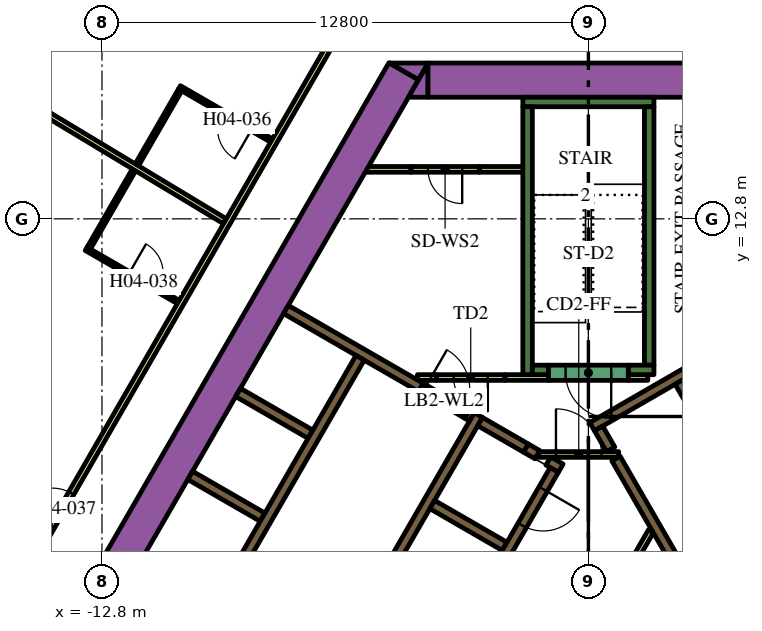
"""IFC4 building model, lengths in metres.
Left out: names, types, materials, properties, quantities, classifications, styles, units other than length and angle.
Written with IfcOpenShell. Run it as: python <this file> out.ifc"""

import sys

from ifc_helpers import new_model, si_unit, direction, frame, frame_2d, origin, place, context, subcontext, project, spatial, polyline, rectangle, outline, extrude, element, fill, save


model = new_model("IFC4")
c1 = context("Model", 3, precision=1e-05, world=origin(), true_north=direction((0.0, 1.0)))
c2 = subcontext(c1, "Body", "Model", "MODEL_VIEW")
j1 = project(units=[si_unit("LENGTHUNIT", "METRE"), si_unit("PLANEANGLEUNIT", "RADIAN")], contexts=[c1])
p1 = place(None, origin())
s1 = spatial("IfcSite", under=j1, at=p1, CompositionType="ELEMENT")
p2 = place(p1, origin())
s2 = spatial("IfcBuilding", under=s1, at=p2, CompositionType="ELEMENT")
p3 = place(p2, frame((0.0, 0.0, 70.5)))
s3 = spatial("IfcBuildingStorey", under=s2, at=p3, CompositionType="ELEMENT", Elevation=70.5)
p4 = place(p3, frame((-15.36, -1.503, 0.0), z_axis=(0.0, 0.0, 1.0), x_axis=(0.50000389221, 0.866023156604, 0.0)))
e1 = element("IfcWall", 1, at=p4, inside=s3, PredefinedType="SOLIDWALL", context=c2, shape_type="SweptSolid", body=[
    extrude(rectangle(XDim=21.0, YDim=0.9, at=frame_2d((10.5, 0.0))), origin(), (0.0, 0.0, 1.0), 3.9),
])
p5 = place(p3, origin())
e2 = element("IfcWall", 2, at=p5, inside=s3, PredefinedType="SOLIDWALL", context=c2, shape_type="SweptSolid", body=[
    extrude(outline(polyline([(-4.215, 16.9), (-4.469, 16.46), (-5.231, 16.9), (-4.215, 16.9)])), origin(), (0.0, 0.0, 1.0), 3.9),
])
p6 = place(p3, frame((-4.224, 16.45, 0.0), z_axis=(0.0, 0.0, 1.0), x_axis=(1.0, 0.0, 0.0)))
e3 = element("IfcWall", 3, at=p6, inside=s3, PredefinedType="SOLIDWALL", context=c2, shape_type="SweptSolid", body=[
    extrude(rectangle(XDim=9.488, YDim=0.9, at=frame_2d((4.744, 0.0))), origin(), (0.0, 0.0, 1.0), 3.9),
])
e4 = element("IfcWall", 4, at=p5, inside=s3, PredefinedType="SOLIDWALL", context=c2, shape_type="SweptSolid", body=[
    extrude(outline(polyline([(-4.734, 16.0), (-4.226, 16.88), (-4.226, 16.0), (-4.734, 16.0)])), origin(), (0.0, 0.0, 1.0), 3.9),
])
p7 = place(p3, frame((-1.725, 15.875, 0.0), z_axis=(0.0, 0.0, 1.0), x_axis=(1.0, 0.0, 0.0)))
e5 = element("IfcWall", 5, at=p7, inside=s3, PredefinedType="SOLIDWALL", context=c2, shape_type="SweptSolid", body=[
    extrude(rectangle(XDim=3.45, YDim=0.25, at=frame_2d((1.725, 0.0))), origin(), (0.0, 0.0, 1.0), 3.9),
])
p8 = place(p3, frame((1.6, 8.95, 0.0), z_axis=(0.0, 0.0, 1.0), x_axis=(0.0, 1.0, 0.0)))
e6 = element("IfcWall", 6, at=p8, inside=s3, PredefinedType="SOLIDWALL", context=c2, shape_type="SweptSolid", body=[
    extrude(rectangle(XDim=6.8, YDim=0.25, at=frame_2d((3.4, 0.0))), origin(), (0.0, 0.0, 1.0), 3.9),
])
p9 = place(p3, frame((1.05, 8.825, 0.0), z_axis=(0.0, 0.0, 1.0), x_axis=(1.0, 0.0, 0.0)))
e7 = element("IfcWall", 7, at=p9, inside=s3, PredefinedType="SOLIDWALL", context=c2, shape_type="SweptSolid", body=[
    extrude(rectangle(XDim=0.675, YDim=0.25, at=frame_2d((0.337, 0.0))), origin(), (0.0, 0.0, 1.0), 3.9),
])
p10 = place(p3, frame((-1.6, 8.7, 0.0), z_axis=(0.0, 0.0, 1.0), x_axis=(0.0, 1.0, 0.0)))
e8 = element("IfcWall", 8, at=p10, inside=s3, PredefinedType="SOLIDWALL", context=c2, shape_type="SweptSolid", body=[
    extrude(rectangle(XDim=7.05, YDim=0.25, at=frame_2d((3.525, 0.0))), origin(), (0.0, 0.0, 1.0), 3.9),
])
p11 = place(p3, frame((-1.475, 8.825, 0.0), z_axis=(0.0, 0.0, 1.0), x_axis=(1.0, 0.0, 0.0)))
e9 = element("IfcWall", 9, at=p11, inside=s3, PredefinedType="SOLIDWALL", context=c2, shape_type="SweptSolid", body=[
    extrude(rectangle(XDim=0.425, YDim=0.25, at=frame_2d((0.212, 0.0))), origin(), (0.0, 0.0, 1.0), 3.9),
])
p12 = place(p3, frame((0.098, 7.331, 0.0), z_axis=(0.0, 0.0, 1.0), x_axis=(0.865988154826, 0.50006451154, 0.0)))
e10 = element("IfcWall", 10, at=p12, inside=s3, PredefinedType="SOLIDWALL", context=c2, shape_type="SweptSolid", body=[
    extrude(rectangle(XDim=3.398, YDim=0.25, at=frame_2d((1.699, 0.0))), origin(), (0.0, 0.0, 1.0), 3.9),
])
p13 = place(p3, frame((0.268, 7.285, 0.0), z_axis=(0.0, 0.0, 1.0), x_axis=(0.500098681536, -0.865968422476, 0.0)))
e11 = element("IfcWall", 11, at=p13, inside=s3, PredefinedType="SOLIDWALL", context=c2, shape_type="SweptSolid", body=[
    extrude(rectangle(XDim=0.636, YDim=0.25, at=frame_2d((0.318, 0.0))), origin(), (0.0, 0.0, 1.0), 3.9),
])
p14 = place(p3, frame((5.97, -2.591, 0.0), z_axis=(0.0, 0.0, 1.0), x_axis=(-0.499994469932, 0.866028596547, 0.0)))
e12 = element("IfcWall", 12, at=p14, inside=s3, PredefinedType="SOLIDWALL", context=c2, shape_type="SweptSolid", body=[
    extrude(rectangle(XDim=10.488, YDim=0.25, at=frame_2d((5.244, 0.0))), origin(), (0.0, 0.0, 1.0), 3.9),
])
p15 = place(p3, frame((-8.06, -1.311, 0.0), z_axis=(0.0, 0.0, 1.0), x_axis=(0.50000273126, 0.866023826885, 0.0)))
e13 = element("IfcWall", 13, at=p15, inside=s3, PredefinedType="SOLIDWALL", context=c2, shape_type="SweptSolid", body=[
    extrude(rectangle(XDim=10.33, YDim=0.25, at=frame_2d((5.165, 0.0))), origin(), (0.0, 0.0, 1.0), 3.9),
])
p16 = place(p3, frame((-1.342, 6.595, 0.0), z_axis=(0.0, 0.0, 1.0), x_axis=(-0.866046247233, 0.49996389635, 0.0)))
e14 = element("IfcWall", 14, at=p16, inside=s3, PredefinedType="SOLIDWALL", context=c2, shape_type="SweptSolid", body=[
    extrude(rectangle(XDim=0.35, YDim=0.25, at=frame_2d((0.175, 0.0))), origin(), (0.0, 0.0, 1.0), 3.9),
])
p17 = place(p3, frame((-1.647, 6.771, 0.0), z_axis=(0.0, 0.0, 1.0), x_axis=(-0.865971728693, 0.500092956464, 0.0)))
e15 = element("IfcWall", 15, at=p17, inside=s3, PredefinedType="SOLIDWALL", context=c2, shape_type="SweptSolid", body=[
    extrude(rectangle(XDim=1.388, YDim=0.25, at=frame_2d((0.694, 0.0))), origin(), (0.0, 0.0, 1.0), 3.9),
])
p18 = place(p3, frame((-0.728, 6.24, 0.0), z_axis=(0.0, 0.0, 1.0), x_axis=(-0.866088799389, 0.499890179513, 0.0)))
e16 = element("IfcWall", 16, at=p18, inside=s3, PredefinedType="SOLIDWALL", context=c2, shape_type="SweptSolid", body=[
    extrude(rectangle(XDim=0.378, YDim=0.25, at=frame_2d((0.189, 0.0))), origin(), (0.0, 0.0, 1.0), 3.9),
])
p19 = place(p3, frame((-2.204, 4.182, 0.0), z_axis=(0.0, 0.0, 1.0), x_axis=(-0.866008176907, 0.50002983664, 0.0)))
e17 = element("IfcWall", 17, at=p19, inside=s3, PredefinedType="SOLIDWALL", context=c2, shape_type="SweptSolid", body=[
    extrude(rectangle(XDim=2.2, YDim=0.25, at=frame_2d((1.1, 0.0))), origin(), (0.0, 0.0, 1.0), 3.9),
])
e18 = element("IfcWall", 18, at=p5, inside=s3, PredefinedType="SOLIDWALL", context=c2, shape_type="SweptSolid", body=[
    extrude(outline(polyline([(-3.128, 7.481), (-3.259, 7.557), (-3.134, 7.773), (-3.003, 7.698), (-3.128, 7.481)])), origin(), (0.0, 0.0, 1.0), 3.9),
])
for number, where, z_axis, x_axis in (
    (19, (-8.574, 4.95, 0.0), (0.0, 0.0, 1.0), (-0.866, 0.5, 0.0)),
    (20, (-7.314, 7.132, 0.0), (0.0, 0.0, 1.0), (-0.866, 0.5, 0.0)),
):
    element("IfcWall", number, at=place(p3, frame(where, z_axis=z_axis, x_axis=x_axis)), inside=s3, PredefinedType="SOLIDWALL", context=c2, shape_type="SweptSolid", body=[
        extrude(rectangle(XDim=2.2, YDim=0.25, at=frame_2d((1.1, 0.0))), origin(), (0.0, 0.0, 1.0), 3.9),
    ])
p20 = place(p3, frame((-7.959, 10.415, 0.0), z_axis=(0.0, 0.0, 1.0), x_axis=(0.866020958405, -0.500007699544, 0.0)))
e21 = element("IfcWall", 21, at=p20, inside=s3, PredefinedType="SOLIDWALL", context=c2, shape_type="SweptSolid", body=[
    extrude(rectangle(XDim=4.1, YDim=0.25, at=frame_2d((2.05, 0.0))), origin(), (0.0, 0.0, 1.0), 3.9),
])
p21 = place(p3, frame((-3.997, 8.625, 0.0), z_axis=(0.0, 0.0, 1.0), x_axis=(-1.0, 0.0, 0.0)))
e22 = element("IfcWall", 22, at=p21, inside=s3, PredefinedType="PARTITIONING", context=c2, shape_type="SweptSolid", body=[
    extrude(rectangle(XDim=0.502, YDim=0.15, at=frame_2d((0.251, 0.0))), origin(), (0.0, 0.0, 1.0), 2.75),
])
p22 = place(p3, frame((-5.851, 14.102, 0.0), z_axis=(0.0, 0.0, 1.0), x_axis=(1.0, 0.0, 0.0)))
e23 = element("IfcWall", 23, at=p22, inside=s3, PredefinedType="PARTITIONING", context=c2, shape_type="SweptSolid", body=[
    extrude(rectangle(XDim=1.18, YDim=0.15, at=frame_2d((0.59, 0.0))), origin(), (0.0, 0.0, 1.0), 2.75),
])
p23 = place(p3, frame((-2.871, 14.102, 0.0), z_axis=(0.0, 0.0, 1.0), x_axis=(1.0, 0.0, 0.0)))
e24 = element("IfcWall", 24, at=p23, inside=s3, PredefinedType="PARTITIONING", context=c2, shape_type="SweptSolid", body=[
    extrude(rectangle(XDim=1.196, YDim=0.15, at=frame_2d((0.598, 0.0))), origin(), (0.0, 0.0, 1.0), 2.75),
])
p24 = place(p3, frame((-0.3, 1.212, 0.0), z_axis=(0.0, 0.0, 1.0), x_axis=(0.499963101113, 0.866046706318, 0.0)))
e25 = element("IfcWall", 25, at=p24, inside=s3, PredefinedType="PARTITIONING", context=c2, shape_type="SweptSolid", body=[
    extrude(rectangle(XDim=3.893, YDim=0.15, at=frame_2d((1.947, 0.0))), origin(), (0.0, 0.0, 1.0), 2.75),
])
p25 = place(p3, frame((-2.196, 8.625, 0.0), z_axis=(0.0, 0.0, 1.0), x_axis=(1.0, 0.0, 0.0)))
e26 = element("IfcWall", 26, at=p25, inside=s3, PredefinedType="PARTITIONING", context=c2, shape_type="SweptSolid", body=[
    extrude(rectangle(XDim=1.146, YDim=0.15, at=frame_2d((0.573, 0.0))), origin(), (0.0, 0.0, 1.0), 2.75),
])
p26 = place(p3, frame((1.05, 8.625, 0.0), z_axis=(0.0, 0.0, 1.0), x_axis=(1.0, 0.0, 0.0)))
e27 = element("IfcWall", 27, at=p26, inside=s3, PredefinedType="PARTITIONING", context=c2, shape_type="SweptSolid", body=[
    extrude(rectangle(XDim=0.514, YDim=0.15, at=frame_2d((0.257, 0.0))), origin(), (0.0, 0.0, 1.0), 2.75),
])
p27 = place(p3, frame((8.565, -2.185, 0.0), z_axis=(0.0, 0.0, 1.0), x_axis=(-0.499997954832, 0.866026584559, 0.0)))
e28 = element("IfcWall", 28, at=p27, inside=s3, PredefinedType="SOLIDWALL", context=c2, shape_type="SweptSolid", body=[
    extrude(rectangle(XDim=12.35, YDim=0.25, at=frame_2d((6.175, 0.0))), origin(), (0.0, 0.0, 1.0), 3.9),
])
p28 = place(p27, frame((5.725, 0.0, 0.0)))
e29 = element("IfcOpeningElement", 29, at=p28, cuts=e28, PredefinedType="OPENING", context=c2, shape_type="SweptSolid", body=[
    extrude(rectangle(XDim=0.9, YDim=2.1, at=frame_2d((0.45, 1.05))), frame((0.0, 0.135, 0.0), z_axis=(0.0, -1.0, 0.0), x_axis=(1.0, 0.0, 0.0)), (0.0, 0.0, 1.0), 0.27),
])
p29 = place(p3, frame((-6.008, 9.144, 0.0), z_axis=(0.0, 0.0, 1.0), x_axis=(-0.500006956611, -0.866021387346, 0.0)))
e30 = element("IfcWall", 30, at=p29, inside=s3, PredefinedType="SOLIDWALL", context=c2, shape_type="SweptSolid", body=[
    extrude(rectangle(XDim=9.83, YDim=0.25, at=frame_2d((4.915, 0.0))), origin(), (0.0, 0.0, 1.0), 3.9),
])
p30 = place(p29, frame((6.985, 0.0, 0.0)))
e31 = element("IfcOpeningElement", 31, at=p30, cuts=e30, PredefinedType="OPENING", context=c2, shape_type="SweptSolid", body=[
    extrude(rectangle(XDim=0.9, YDim=2.1, at=frame_2d((0.45, 1.05))), frame((0.0, 0.135, 0.0), z_axis=(0.0, -1.0, 0.0), x_axis=(1.0, 0.0, 0.0)), (0.0, 0.0, 1.0), 0.27),
])
p31 = place(p3, frame((-0.898, 6.194, 0.0), z_axis=(0.0, 0.0, 1.0), x_axis=(-0.499996202215, -0.866027596426, 0.0)))
e32 = element("IfcWall", 32, at=p31, inside=s3, PredefinedType="SOLIDWALL", context=c2, shape_type="SweptSolid", body=[
    extrude(rectangle(XDim=9.83, YDim=0.25, at=frame_2d((4.915, 0.0))), origin(), (0.0, 0.0, 1.0), 3.9),
])
p32 = place(p31, frame((0.585, 0.0, 0.0)))
e33 = element("IfcOpeningElement", 33, at=p32, cuts=e32, PredefinedType="OPENING", context=c2, shape_type="SweptSolid", body=[
    extrude(rectangle(XDim=1.1, YDim=2.1, at=frame_2d((0.55, 1.05))), frame((0.0, 0.135, 0.0), z_axis=(0.0, -1.0, 0.0), x_axis=(1.0, 0.0, 0.0)), (0.0, 0.0, 1.0), 0.27),
])
p33 = place(p31, frame((3.105, 0.0, 0.0)))
e34 = element("IfcOpeningElement", 34, at=p33, cuts=e32, PredefinedType="OPENING", context=c2, shape_type="SweptSolid", body=[
    extrude(rectangle(XDim=1.1, YDim=2.1, at=frame_2d((0.55, 1.05))), frame((0.0, 0.135, 0.0), z_axis=(0.0, -1.0, 0.0), x_axis=(1.0, 0.0, 0.0)), (0.0, 0.0, 1.0), 0.27),
])
p34 = place(p31, frame((5.625, 0.0, 0.0)))
e35 = element("IfcOpeningElement", 35, at=p34, cuts=e32, PredefinedType="OPENING", context=c2, shape_type="SweptSolid", body=[
    extrude(rectangle(XDim=1.1, YDim=2.1, at=frame_2d((0.55, 1.05))), frame((0.0, 0.135, 0.0), z_axis=(0.0, -1.0, 0.0), x_axis=(1.0, 0.0, 0.0)), (0.0, 0.0, 1.0), 0.27),
])
p35 = place(p31, frame((8.145, 0.0, 0.0)))
e36 = element("IfcOpeningElement", 36, at=p35, cuts=e32, PredefinedType="OPENING", context=c2, shape_type="SweptSolid", body=[
    extrude(rectangle(XDim=1.1, YDim=2.1, at=frame_2d((0.55, 1.05))), frame((0.0, 0.135, 0.0), z_axis=(0.0, -1.0, 0.0), x_axis=(1.0, 0.0, 0.0)), (0.0, 0.0, 1.0), 0.27),
])
p36 = place(p3, frame((1.05, 8.75, 0.0), z_axis=(0.0, 0.0, 1.0), x_axis=(-1.0, 0.0, 0.0)))
e37 = element("IfcWall", 37, at=p36, inside=s3, PredefinedType="SOLIDWALL", context=c2, shape_type="SweptSolid", body=[
    extrude(rectangle(XDim=2.1, YDim=0.4, at=frame_2d((1.05, 0.0))), origin(), (0.0, 0.0, 1.0), 3.9),
])
p37 = place(p36, frame((0.45, 0.0, 0.0)))
e38 = element("IfcOpeningElement", 38, at=p37, cuts=e37, PredefinedType="OPENING", context=c2, shape_type="SweptSolid", body=[
    extrude(rectangle(XDim=1.2, YDim=2.1, at=frame_2d((0.6, 1.05))), frame((0.0, 0.21, 0.0), z_axis=(0.0, -1.0, 0.0), x_axis=(1.0, 0.0, 0.0)), (0.0, 0.0, 1.0), 0.42),
])
p38 = place(p3, frame((-2.196, 8.625, 0.0), z_axis=(0.0, 0.0, 1.0), x_axis=(-1.0, 0.0, 0.0)))
e39 = element("IfcWall", 39, at=p38, inside=s3, PredefinedType="PARTITIONING", context=c2, shape_type="SweptSolid", body=[
    extrude(rectangle(XDim=1.8, YDim=0.15, at=frame_2d((0.9, 0.0))), origin(), (0.0, 0.0, 1.0), 2.75),
])
p39 = place(p38, frame((0.45, 0.0, 0.0)))
e40 = element("IfcOpeningElement", 40, at=p39, cuts=e39, PredefinedType="OPENING", context=c2, shape_type="SweptSolid", body=[
    extrude(rectangle(XDim=0.9, YDim=2.1, at=frame_2d((0.45, 1.05))), frame((0.0, 0.085, 0.0), z_axis=(0.0, -1.0, 0.0), x_axis=(1.0, 0.0, 0.0)), (0.0, 0.0, 1.0), 0.17),
])
p40 = place(p3, frame((-1.303, 6.6, 0.0), z_axis=(0.0, 0.0, 1.0), x_axis=(1.0, 0.0, 0.0)))
e41 = element("IfcWall", 41, at=p40, inside=s3, PredefinedType="PARTITIONING", context=c2, shape_type="SweptSolid", body=[
    extrude(rectangle(XDim=2.1, YDim=0.15, at=frame_2d((1.05, 0.0))), origin(), (0.0, 0.0, 1.0), 3.9),
])
p41 = place(p40, frame((0.45, 0.0, 0.0)))
e42 = element("IfcOpeningElement", 42, at=p41, cuts=e41, PredefinedType="OPENING", context=c2, shape_type="SweptSolid", body=[
    extrude(rectangle(XDim=1.2, YDim=2.1, at=frame_2d((0.6, 1.05))), frame((0.0, 0.085, 0.0), z_axis=(0.0, -1.0, 0.0), x_axis=(1.0, 0.0, 0.0)), (0.0, 0.0, 1.0), 0.17),
])
p42 = place(p3, frame((-4.409, 8.365, 0.0), z_axis=(0.0, 0.0, 1.0), x_axis=(0.866034573852, -0.49998411664, 0.0)))
e43 = element("IfcWall", 43, at=p42, inside=s3, PredefinedType="SOLIDWALL", context=c2, shape_type="SweptSolid", body=[
    extrude(rectangle(XDim=1.4, YDim=0.25, at=frame_2d((0.7, 0.0))), origin(), (0.0, 0.0, 1.0), 3.9),
])
p43 = place(p42, frame((0.1, 0.0, 0.0)))
e44 = element("IfcOpeningElement", 44, at=p43, cuts=e43, PredefinedType="OPENING", context=c2, shape_type="SweptSolid", body=[
    extrude(rectangle(XDim=1.2, YDim=2.1, at=frame_2d((0.6, 1.05))), frame((0.0, 0.135, 0.0), z_axis=(0.0, -1.0, 0.0), x_axis=(1.0, 0.0, 0.0)), (0.0, 0.0, 1.0), 0.27),
])
p44 = place(p3, frame((-2.871, 14.102, 0.0), z_axis=(0.0, 0.0, 1.0), x_axis=(-1.0, 0.0, 0.0)))
e45 = element("IfcWall", 45, at=p44, inside=s3, PredefinedType="PARTITIONING", context=c2, shape_type="SweptSolid", body=[
    extrude(rectangle(XDim=1.8, YDim=0.15, at=frame_2d((0.9, 0.0))), origin(), (0.0, 0.0, 1.0), 2.75),
])
p45 = place(p44, frame((0.45, 0.0, 0.0)))
e46 = element("IfcOpeningElement", 46, at=p45, cuts=e45, PredefinedType="OPENING", context=c2, shape_type="SweptSolid", body=[
    extrude(rectangle(XDim=0.9, YDim=2.1, at=frame_2d((0.45, 1.05))), frame((0.0, 0.085, 0.0), z_axis=(0.0, -1.0, 0.0), x_axis=(1.0, 0.0, 0.0)), (0.0, 0.0, 1.0), 0.17),
])
p46 = place(p3, frame((-19.081, -3.9, 0.0), z_axis=(0.0, 0.0, 1.0), x_axis=(0.499998313975, 0.866026377209, 0.0)))
e47 = element("IfcWall", 47, at=p46, inside=s3, PredefinedType="PARTITIONING", context=c2, shape_type="SweptSolid", body=[
    extrude(rectangle(XDim=25.766, YDim=0.15, at=frame_2d((12.883, 0.0))), origin(), (0.0, 0.0, 1.0), 2.75),
])
p47 = place(p46, frame((24.586, 0.0, 0.0)))
e48 = element("IfcOpeningElement", 48, at=p47, cuts=e47, PredefinedType="OPENING", context=c2, shape_type="SweptSolid", body=[
    extrude(rectangle(XDim=1.0, YDim=2.1, at=frame_2d((0.5, 1.05))), frame((0.0, 0.085, 0.0), z_axis=(0.0, -1.0, 0.0), x_axis=(1.0, 0.0, 0.0)), (0.0, 0.0, 1.0), 0.17),
])
p48 = place(p46, frame((9.948, 0.0, 0.0)))
e49 = element("IfcOpeningElement", 49, at=p48, cuts=e47, PredefinedType="OPENING", context=c2, shape_type="SweptSolid", body=[
    extrude(rectangle(XDim=1.0, YDim=2.1, at=frame_2d((0.5, 1.05))), frame((0.0, 0.085, 0.0), z_axis=(0.0, -1.0, 0.0), x_axis=(1.0, 0.0, 0.0)), (0.0, 0.0, 1.0), 0.17),
])
p49 = place(p46, frame((7.782, 0.0, 0.0)))
e50 = element("IfcOpeningElement", 50, at=p49, cuts=e47, PredefinedType="OPENING", context=c2, shape_type="SweptSolid", body=[
    extrude(rectangle(XDim=0.9, YDim=2.1, at=frame_2d((0.45, 1.05))), frame((0.0, 0.085, 0.0), z_axis=(0.0, -1.0, 0.0), x_axis=(1.0, 0.0, 0.0)), (0.0, 0.0, 1.0), 0.17),
])
p50 = place(p46, frame((4.658, 0.0, 0.0)))
e51 = element("IfcOpeningElement", 51, at=p50, cuts=e47, PredefinedType="OPENING", context=c2, shape_type="SweptSolid", body=[
    extrude(rectangle(XDim=0.9, YDim=2.1, at=frame_2d((0.45, 1.05))), frame((0.0, 0.085, 0.0), z_axis=(0.0, -1.0, 0.0), x_axis=(1.0, 0.0, 0.0)), (0.0, 0.0, 1.0), 0.17),
])
p51 = place(p3, frame((-16.729, 17.052, 0.0), z_axis=(0.0, 0.0, 1.0), x_axis=(0.856630606266, -0.515930232113, 0.0)))
e52 = element("IfcWall", 52, at=p51, inside=s3, PredefinedType="PARTITIONING", context=c2, shape_type="SweptSolid", body=[
    extrude(rectangle(XDim=8.355, YDim=0.15, at=frame_2d((4.178, 0.0))), origin(), (0.0, 0.0, 1.0), 2.75),
])
p52 = place(p3, frame((-8.337, 14.861, 0.0), z_axis=(0.0, 0.0, 1.0), x_axis=(-0.866034573852, 0.49998411664, 0.0)))
e53 = element("IfcWall", 53, at=p52, inside=s3, PredefinedType="PARTITIONING", context=c2, shape_type="SweptSolid", body=[
    extrude(rectangle(XDim=2.8, YDim=0.1, at=frame_2d((1.4, 0.0))), origin(), (0.0, 0.0, 1.0), 2.75),
])
p53 = place(p52, frame((0.6, 0.0, 0.0)))
e54 = element("IfcOpeningElement", 54, at=p53, cuts=e53, PredefinedType="OPENING", context=c2, shape_type="SweptSolid", body=[
    extrude(rectangle(XDim=0.9, YDim=2.1, at=frame_2d((0.45, 1.05))), frame((0.0, 0.06, 0.0), z_axis=(0.0, -1.0, 0.0), x_axis=(1.0, 0.0, 0.0)), (0.0, 0.0, 1.0), 0.12),
])
p54 = place(p3, frame((-10.743, 16.192, 0.0), z_axis=(0.0, 0.0, 1.0), x_axis=(-0.500014167291, -0.866017224141, 0.0)))
e55 = element("IfcWall", 55, at=p54, inside=s3, PredefinedType="PARTITIONING", context=c2, shape_type="SweptSolid", body=[
    extrude(rectangle(XDim=2.27, YDim=0.1, at=frame_2d((1.135, 0.0))), origin(), (0.0, 0.0, 1.0), 2.75),
])
p55 = place(p3, frame((-13.215, 12.011, 0.0), z_axis=(0.0, 0.0, 1.0), x_axis=(0.865996816683, -0.500049511043, 0.0)))
e56 = element("IfcWall", 56, at=p55, inside=s3, PredefinedType="PARTITIONING", context=c2, shape_type="SweptSolid", body=[
    extrude(rectangle(XDim=2.8, YDim=0.1, at=frame_2d((1.4, 0.0))), origin(), (0.0, 0.0, 1.0), 2.75),
])
p56 = place(p55, frame((1.3, 0.0, 0.0)))
e57 = element("IfcOpeningElement", 57, at=p56, cuts=e56, PredefinedType="OPENING", context=c2, shape_type="SweptSolid", body=[
    extrude(rectangle(XDim=0.9, YDim=2.1, at=frame_2d((0.45, 1.05))), frame((0.0, 0.06, 0.0), z_axis=(0.0, -1.0, 0.0), x_axis=(1.0, 0.0, 0.0)), (0.0, 0.0, 1.0), 0.12),
])
p57 = place(p3, frame((-13.147, 12.029, 0.0), z_axis=(0.0, 0.0, 1.0), x_axis=(0.499939447199, 0.866060361138, 0.0)))
e58 = element("IfcWall", 58, at=p57, inside=s3, PredefinedType="PARTITIONING", context=c2, shape_type="SweptSolid", body=[
    extrude(rectangle(XDim=2.37, YDim=0.1, at=frame_2d((1.185, 0.0))), origin(), (0.0, 0.0, 1.0), 2.75),
])
p58 = place(p32, origin())
e59 = element("IfcDoor", 59, at=p58, inside=s3, OperationType="DOUBLE_DOOR_SLIDING", PredefinedType="DOOR", context=c2, shape_type="SweptSolid", body=[
    extrude(rectangle(XDim=1.1, YDim=2.1, at=frame_2d((0.55, 1.05))), frame((0.0, 0.025, 0.0), z_axis=(0.0, -1.0, 0.0), x_axis=(1.0, 0.0, 0.0)), (0.0, 0.0, 1.0), 0.05),
])
fill(e33, e59)
p59 = place(p37, origin())
e60 = element("IfcDoor", 60, at=p59, inside=s3, OperationType="SINGLE_SWING_LEFT", PredefinedType="DOOR", context=c2, shape_type="SweptSolid", body=[
    extrude(rectangle(XDim=1.2, YDim=2.1, at=frame_2d((0.6, 1.05))), frame((0.0, 0.025, 0.0), z_axis=(0.0, -1.0, 0.0), x_axis=(1.0, 0.0, 0.0)), (0.0, 0.0, 1.0), 0.05),
])
fill(e38, e60)
p60 = place(p39, origin())
e61 = element("IfcDoor", 61, at=p60, inside=s3, OperationType="SINGLE_SWING_LEFT", PredefinedType="DOOR", context=c2, shape_type="SweptSolid", body=[
    extrude(rectangle(XDim=0.9, YDim=2.1, at=frame_2d((0.45, 1.05))), frame((0.0, 0.025, 0.0), z_axis=(0.0, -1.0, 0.0), x_axis=(1.0, 0.0, 0.0)), (0.0, 0.0, 1.0), 0.05),
])
fill(e40, e61)
p61 = place(p41, origin())
e62 = element("IfcDoor", 62, at=p61, inside=s3, OperationType="SINGLE_SWING_LEFT", PredefinedType="DOOR", context=c2, shape_type="SweptSolid", body=[
    extrude(rectangle(XDim=1.2, YDim=2.1, at=frame_2d((0.6, 1.05))), frame((0.0, 0.025, 0.0), z_axis=(0.0, -1.0, 0.0), x_axis=(1.0, 0.0, 0.0)), (0.0, 0.0, 1.0), 0.05),
])
fill(e42, e62)
p62 = place(p43, origin())
e63 = element("IfcDoor", 63, at=p62, inside=s3, OperationType="SINGLE_SWING_LEFT", PredefinedType="DOOR", context=c2, shape_type="SweptSolid", body=[
    extrude(rectangle(XDim=1.2, YDim=2.1, at=frame_2d((0.6, 1.05))), frame((0.0, 0.025, 0.0), z_axis=(0.0, -1.0, 0.0), x_axis=(1.0, 0.0, 0.0)), (0.0, 0.0, 1.0), 0.05),
])
fill(e44, e63)
p63 = place(p45, origin())
e64 = element("IfcDoor", 64, at=p63, inside=s3, OperationType="SINGLE_SWING_LEFT", PredefinedType="DOOR", context=c2, shape_type="SweptSolid", body=[
    extrude(rectangle(XDim=0.9, YDim=2.1, at=frame_2d((0.45, 1.05))), frame((0.0, 0.025, 0.0), z_axis=(0.0, -1.0, 0.0), x_axis=(1.0, 0.0, 0.0)), (0.0, 0.0, 1.0), 0.05),
])
fill(e46, e64)
p64 = place(p53, origin())
e65 = element("IfcDoor", 65, at=p64, inside=s3, OperationType="SINGLE_SWING_RIGHT", PredefinedType="DOOR", context=c2, shape_type="SweptSolid", body=[
    extrude(rectangle(XDim=0.9, YDim=2.1, at=frame_2d((0.45, 1.05))), frame((0.0, 0.025, 0.0), z_axis=(0.0, -1.0, 0.0), x_axis=(1.0, 0.0, 0.0)), (0.0, 0.0, 1.0), 0.05),
])
fill(e54, e65)
p65 = place(p48, origin())
e66 = element("IfcDoor", 66, at=p65, inside=s3, OperationType="SINGLE_SWING_LEFT", PredefinedType="DOOR", context=c2, shape_type="SweptSolid", body=[
    extrude(rectangle(XDim=1.0, YDim=2.1, at=frame_2d((0.5, 1.05))), frame((0.0, 0.025, 0.0), z_axis=(0.0, -1.0, 0.0), x_axis=(1.0, 0.0, 0.0)), (0.0, 0.0, 1.0), 0.05),
])
fill(e49, e66)
p66 = place(p56, origin())
e67 = element("IfcDoor", 67, at=p66, inside=s3, OperationType="SINGLE_SWING_LEFT", PredefinedType="DOOR", context=c2, shape_type="SweptSolid", body=[
    extrude(rectangle(XDim=0.9, YDim=2.1, at=frame_2d((0.45, 1.05))), frame((0.0, 0.025, 0.0), z_axis=(0.0, -1.0, 0.0), x_axis=(1.0, 0.0, 0.0)), (0.0, 0.0, 1.0), 0.05),
])
fill(e57, e67)
save(model, sys.argv[1])
